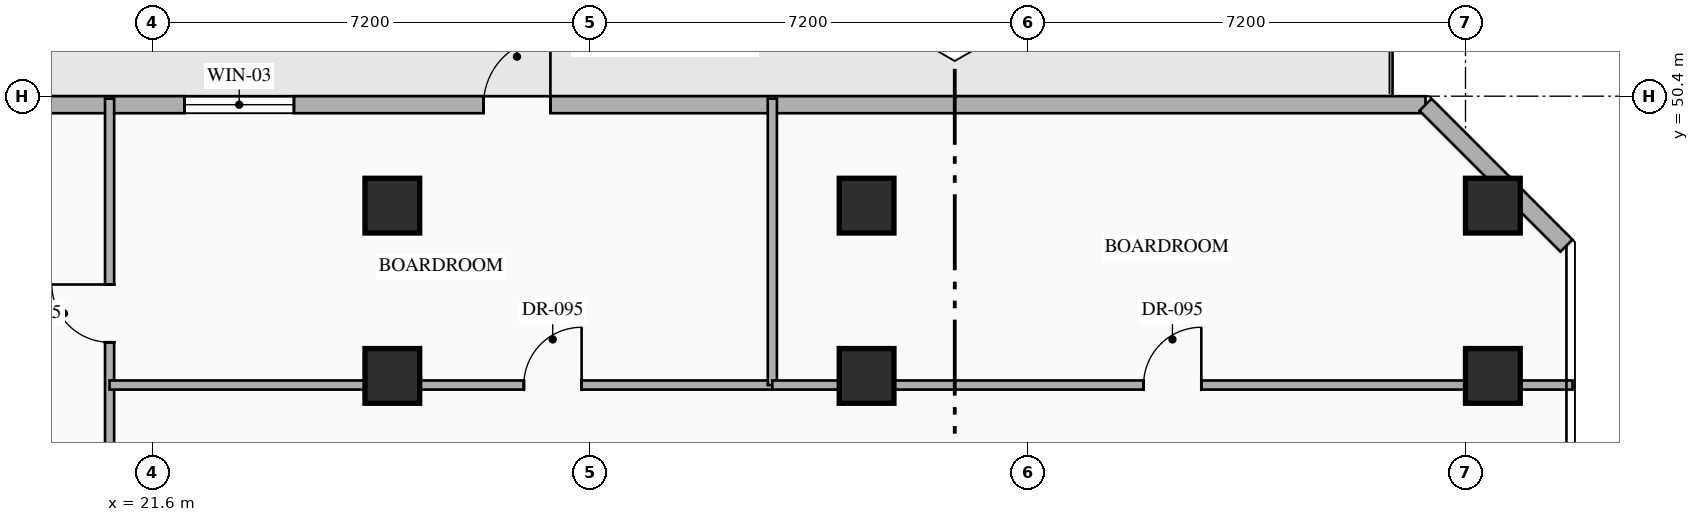
"""IFC4 building model, lengths in metres.
Left out: names, types, materials, properties, quantities, classifications, styles, units other than length and angle.
Written with IfcOpenShell. Run it as: python <this file> out.ifc"""

import sys

from ifc_helpers import new_model, si_unit, direction, frame, frame_2d, origin, origin_2d, place, context, subcontext, project, spatial, rectangle, hollow_rectangle, extrude, element, fill, save


model = new_model("IFC4")
c1 = context("Model", 3, precision=1e-05, world=origin(), true_north=direction((0.0, 1.0)))
c2 = subcontext(c1, "Body", "Model", "MODEL_VIEW")
j1 = project(units=[si_unit("LENGTHUNIT", "METRE"), si_unit("PLANEANGLEUNIT", "RADIAN")], contexts=[c1])
p1 = place(None, origin())
s1 = spatial("IfcSite", under=j1, at=p1, CompositionType="ELEMENT")
p2 = place(p1, origin())
s2 = spatial("IfcBuilding", under=s1, at=p2, CompositionType="ELEMENT")
p3 = place(p2, frame((0.0, 0.0, 108.45)))
s3 = spatial("IfcBuildingStorey", under=s2, at=p3, CompositionType="ELEMENT", Elevation=108.45)
for number, where, z_axis, x_axis in (
    (1, (25.55, 45.8, 0.0), (0.0, 0.0, 1.0), (1.0, 0.0, 0.0)),
    (2, (33.35, 45.8, 0.0), (0.0, 0.0, 1.0), (1.0, 0.0, 0.0)),
    (3, (43.65, 45.8, 0.0), (0.0, 0.0, 1.0), (1.0, 0.0, 0.0)),
    (4, (25.55, 48.6, 0.0), (0.0, 0.0, 1.0), (1.0, 0.0, 0.0)),
    (5, (33.35, 48.6, 0.0), (0.0, 0.0, 1.0), (1.0, 0.0, 0.0)),
    (6, (43.65, 48.6, 0.0), (0.0, 0.0, 1.0), (1.0, 0.0, 0.0)),
):
    element("IfcColumn", number, at=place(p3, frame(where, z_axis=z_axis, x_axis=x_axis)), inside=s3, PredefinedType="COLUMN", context=c2, shape_type="SweptSolid", body=[
        extrude(hollow_rectangle(XDim=0.9, YDim=0.9, WallThickness=0.036, at=origin_2d()), origin(), (0.0, 0.0, 1.0), 3.6),
    ])
p4 = place(p3, frame((12.058, 50.26, 0.0), z_axis=(0.0, 0.0, 1.0), x_axis=(1.0, 0.0, 0.0)))
e7 = element("IfcWall", 7, at=p4, inside=s3, PredefinedType="STANDARD", context=c2, shape_type="SweptSolid", body=[
    extrude(rectangle(XDim=30.484, YDim=0.28, at=frame_2d((15.242, 0.0))), origin(), (0.0, 0.0, 1.0), 3.35),
])
p5 = place(p4, frame((14.992, 0.0, 0.0)))
e8 = element("IfcOpeningElement", 8, at=p5, cuts=e7, PredefinedType="OPENING", context=c2, shape_type="SweptSolid", body=[
    extrude(rectangle(XDim=1.1, YDim=2.2, at=frame_2d((0.55, 1.1))), frame((0.0, 0.15, 0.0), z_axis=(0.0, -1.0, 0.0), x_axis=(1.0, 0.0, 0.0)), (0.0, 0.0, 1.0), 0.3),
])
p6 = place(p4, frame((10.074, 0.0, 0.85)))
e9 = element("IfcOpeningElement", 9, at=p6, cuts=e7, PredefinedType="OPENING", context=c2, shape_type="SweptSolid", body=[
    extrude(rectangle(XDim=1.8, YDim=2.1, at=frame_2d((0.9, 1.05))), frame((0.0, 0.15, 0.0), z_axis=(0.0, -1.0, 0.0), x_axis=(1.0, 0.0, 0.0)), (0.0, 0.0, 1.0), 0.3),
])
p7 = place(p3, frame((42.542, 50.26, 0.0), z_axis=(0.0, 0.0, 1.0), x_axis=(0.707106781187, -0.707106781187, 0.0)))
e10 = element("IfcWall", 10, at=p7, inside=s3, PredefinedType="STANDARD", context=c2, shape_type="SweptSolid", body=[
    extrude(rectangle(XDim=3.278, YDim=0.28, at=frame_2d((1.639, 0.0))), origin(), (0.0, 0.0, 1.0), 3.35),
])
p8 = place(p3, frame((20.9, 41.0, 0.0), z_axis=(0.0, 0.0, 1.0), x_axis=(0.0, 1.0, 0.0)))
e11 = element("IfcWall", 11, at=p8, inside=s3, PredefinedType="PARTITIONING", context=c2, shape_type="SweptSolid", body=[
    extrude(rectangle(XDim=9.36, YDim=0.15, at=frame_2d((4.68, 0.0))), origin(), (0.0, 0.0, 1.0), 3.35),
])
p9 = place(p8, frame((5.353, 0.0, 0.0)))
e12 = element("IfcOpeningElement", 12, at=p9, cuts=e11, PredefinedType="OPENING", context=c2, shape_type="SweptSolid", body=[
    extrude(rectangle(XDim=0.95, YDim=2.15, at=frame_2d((0.475, 1.075))), frame((0.0, 0.085, 0.0), z_axis=(0.0, -1.0, 0.0), x_axis=(1.0, 0.0, 0.0)), (0.0, 0.0, 1.0), 0.17),
])
p10 = place(p3, frame((20.9, 45.65, 0.0), z_axis=(0.0, 0.0, 1.0), x_axis=(1.0, 0.0, 0.0)))
e13 = element("IfcWall", 13, at=p10, inside=s3, PredefinedType="PARTITIONING", context=c2, shape_type="SweptSolid", body=[
    extrude(rectangle(XDim=10.9, YDim=0.15, at=frame_2d((5.45, 0.0))), origin(), (0.0, 0.0, 1.0), 2.695),
])
p11 = place(p10, frame((6.813, 0.0, 0.0)))
e14 = element("IfcOpeningElement", 14, at=p11, cuts=e13, PredefinedType="OPENING", context=c2, shape_type="SweptSolid", body=[
    extrude(rectangle(XDim=0.95, YDim=2.15, at=frame_2d((0.475, 1.075))), frame((0.0, 0.085, 0.0), z_axis=(0.0, -1.0, 0.0), x_axis=(1.0, 0.0, 0.0)), (0.0, 0.0, 1.0), 0.17),
])
p12 = place(p3, frame((31.8, 45.65, 0.0), z_axis=(0.0, 0.0, 1.0), x_axis=(0.0, 1.0, 0.0)))
e15 = element("IfcWall", 15, at=p12, inside=s3, PredefinedType="PARTITIONING", context=c2, shape_type="SweptSolid", body=[
    extrude(rectangle(XDim=4.71, YDim=0.15, at=frame_2d((2.355, 0.0))), origin(), (0.0, 0.0, 1.0), 3.35),
])
p13 = place(p3, frame((31.8, 45.65, 0.0), z_axis=(0.0, 0.0, 1.0), x_axis=(1.0, 0.0, 0.0)))
e16 = element("IfcWall", 16, at=p13, inside=s3, PredefinedType="PARTITIONING", context=c2, shape_type="SweptSolid", body=[
    extrude(rectangle(XDim=13.16, YDim=0.15, at=frame_2d((6.58, 0.0))), origin(), (0.0, 0.0, 1.0), 2.695),
])
p14 = place(p13, frame((6.105, 0.0, 0.0)))
e17 = element("IfcOpeningElement", 17, at=p14, cuts=e16, PredefinedType="OPENING", context=c2, shape_type="SweptSolid", body=[
    extrude(rectangle(XDim=0.95, YDim=2.15, at=frame_2d((0.475, 1.075))), frame((0.0, 0.085, 0.0), z_axis=(0.0, -1.0, 0.0), x_axis=(1.0, 0.0, 0.0)), (0.0, 0.0, 1.0), 0.17),
])
p15 = place(p5, origin())
e18 = element("IfcDoor", 18, at=p15, inside=s3, OperationType="SINGLE_SWING_RIGHT", PredefinedType="DOOR", context=c2, shape_type="SweptSolid", body=[
    extrude(rectangle(XDim=1.1, YDim=2.2, at=frame_2d((0.55, 1.1))), frame((0.0, 0.025, 0.0), z_axis=(0.0, -1.0, 0.0), x_axis=(1.0, 0.0, 0.0)), (0.0, 0.0, 1.0), 0.05),
])
fill(e8, e18)
p16 = place(p6, origin())
e19 = element("IfcWindow", 19, at=p16, inside=s3, PartitioningType="SINGLE_PANEL", PredefinedType="WINDOW", context=c2, shape_type="SweptSolid", body=[
    extrude(rectangle(XDim=1.8, YDim=2.1, at=frame_2d((0.9, 1.05))), frame((0.0, 0.03, 0.0), z_axis=(0.0, -1.0, 0.0), x_axis=(1.0, 0.0, 0.0)), (0.0, 0.0, 1.0), 0.06),
])
fill(e9, e19)
p17 = place(p9, origin())
e20 = element("IfcDoor", 20, at=p17, inside=s3, OperationType="SINGLE_SWING_RIGHT", PredefinedType="DOOR", context=c2, shape_type="SweptSolid", body=[
    extrude(rectangle(XDim=0.95, YDim=2.15, at=frame_2d((0.475, 1.075))), frame((0.0, 0.025, 0.0), z_axis=(0.0, -1.0, 0.0), x_axis=(1.0, 0.0, 0.0)), (0.0, 0.0, 1.0), 0.05),
])
fill(e12, e20)
p18 = place(p11, origin())
e21 = element("IfcDoor", 21, at=p18, inside=s3, OperationType="SINGLE_SWING_RIGHT", PredefinedType="DOOR", context=c2, shape_type="SweptSolid", body=[
    extrude(rectangle(XDim=0.95, YDim=2.15, at=frame_2d((0.475, 1.075))), frame((0.0, 0.025, 0.0), z_axis=(0.0, -1.0, 0.0), x_axis=(1.0, 0.0, 0.0)), (0.0, 0.0, 1.0), 0.05),
])
fill(e14, e21)
p19 = place(p14, origin())
e22 = element("IfcDoor", 22, at=p19, inside=s3, OperationType="SINGLE_SWING_RIGHT", PredefinedType="DOOR", context=c2, shape_type="SweptSolid", body=[
    extrude(rectangle(XDim=0.95, YDim=2.15, at=frame_2d((0.475, 1.075))), frame((0.0, 0.025, 0.0), z_axis=(0.0, -1.0, 0.0), x_axis=(1.0, 0.0, 0.0)), (0.0, 0.0, 1.0), 0.05),
])
fill(e17, e22)
save(model, sys.argv[1])
